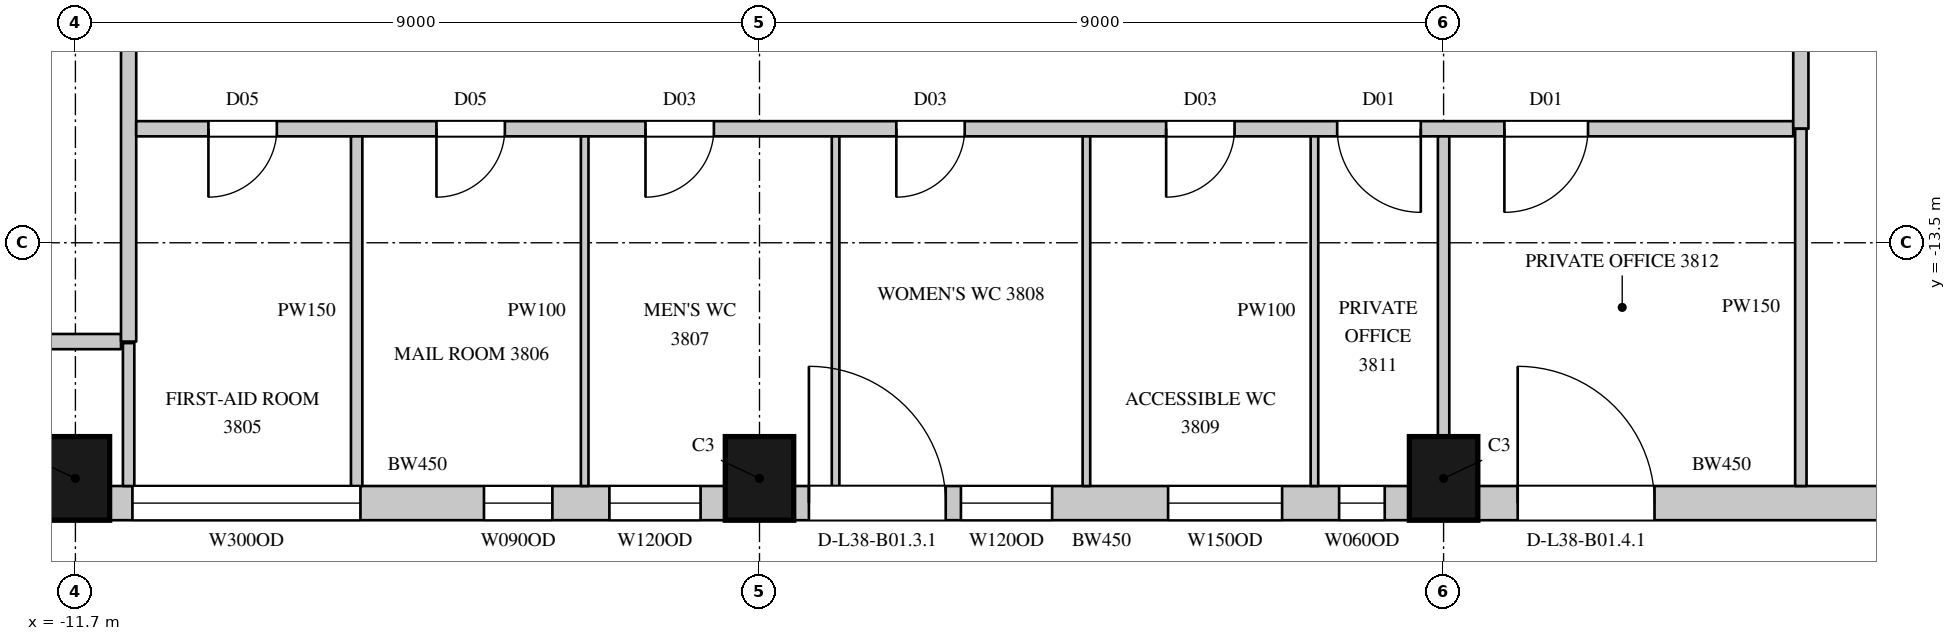
"""IFC4 building model, lengths in metres.
Left out: names, types, materials, properties, quantities, classifications, styles, units other than length and angle.
Written with IfcOpenShell. Run it as: python <this file> out.ifc"""

import sys

from ifc_helpers import new_model, si_unit, direction, frame, frame_2d, origin, origin_2d, place, context, subcontext, project, spatial, rectangle, extrude, element, fill, save


model = new_model("IFC4")
c1 = context("Model", 3, precision=1e-05, world=origin(), true_north=direction((0.0, 1.0)))
c2 = subcontext(c1, "Body", "Model", "MODEL_VIEW")
j1 = project(units=[si_unit("LENGTHUNIT", "METRE"), si_unit("PLANEANGLEUNIT", "RADIAN")], contexts=[c1])
p1 = place(None, origin())
s1 = spatial("IfcSite", under=j1, at=p1, CompositionType="ELEMENT")
p2 = place(p1, origin())
s2 = spatial("IfcBuilding", under=s1, at=p2, CompositionType="ELEMENT")
p3 = place(p2, frame((0.0, 0.0, 176.9)))
s3 = spatial("IfcBuildingStorey", under=s2, at=p3, CompositionType="ELEMENT", Elevation=176.9)
for number, where, z_axis, x_axis in (
    (1, (-11.7, -16.6, 0.0), (0.0, 0.0, 1.0), (1.0, 0.0, 0.0)),
    (2, (-2.7, -16.6, 0.0), (0.0, 0.0, 1.0), (1.0, 0.0, 0.0)),
    (3, (6.3, -16.6, 0.0), (0.0, 0.0, 1.0), (1.0, 0.0, 0.0)),
):
    element("IfcColumn", number, at=place(p3, frame(where, z_axis=z_axis, x_axis=x_axis)), inside=s3, PredefinedType="COLUMN", context=c2, shape_type="SweptSolid", body=[
        extrude(rectangle(XDim=0.9, YDim=1.1, at=origin_2d()), origin(), (0.0, 0.0, 1.0), 4.1),
    ])
p4 = place(p3, frame((-11.25, -16.925, 0.0), z_axis=(0.0, 0.0, 1.0), x_axis=(1.0, 0.0, 0.0)))
e4 = element("IfcWall", 4, at=p4, inside=s3, PredefinedType="SOLIDWALL", context=c2, shape_type="SweptSolid", body=[
    extrude(rectangle(XDim=8.1, YDim=0.45, at=frame_2d((4.05, 0.0))), origin(), (0.0, 0.0, 1.0), 3.8),
])
p5 = place(p4, frame((0.3, 0.0, 1.05)))
e5 = element("IfcOpeningElement", 5, at=p5, cuts=e4, PredefinedType="OPENING", context=c2, shape_type="SweptSolid", body=[
    extrude(rectangle(XDim=3.0, YDim=2.4, at=frame_2d((1.5, 1.2))), frame((0.0, 0.235, 0.0), z_axis=(0.0, -1.0, 0.0), x_axis=(1.0, 0.0, 0.0)), (0.0, 0.0, 1.0), 0.47),
])
p6 = place(p4, frame((4.925, 0.0, 1.05)))
e6 = element("IfcOpeningElement", 6, at=p6, cuts=e4, PredefinedType="OPENING", context=c2, shape_type="SweptSolid", body=[
    extrude(rectangle(XDim=0.9, YDim=2.4, at=frame_2d((0.45, 1.2))), frame((0.0, 0.235, 0.0), z_axis=(0.0, -1.0, 0.0), x_axis=(1.0, 0.0, 0.0)), (0.0, 0.0, 1.0), 0.47),
])
p7 = place(p4, frame((6.575, 0.0, 1.05)))
e7 = element("IfcOpeningElement", 7, at=p7, cuts=e4, PredefinedType="OPENING", context=c2, shape_type="SweptSolid", body=[
    extrude(rectangle(XDim=1.2, YDim=2.4, at=frame_2d((0.6, 1.2))), frame((0.0, 0.235, 0.0), z_axis=(0.0, -1.0, 0.0), x_axis=(1.0, 0.0, 0.0)), (0.0, 0.0, 1.0), 0.47),
])
p8 = place(p3, frame((-2.25, -16.925, 0.0), z_axis=(0.0, 0.0, 1.0), x_axis=(1.0, 0.0, 0.0)))
e8 = element("IfcWall", 8, at=p8, inside=s3, PredefinedType="SOLIDWALL", context=c2, shape_type="SweptSolid", body=[
    extrude(rectangle(XDim=8.1, YDim=0.45, at=frame_2d((4.05, 0.0))), origin(), (0.0, 0.0, 1.0), 3.8),
])
p9 = place(p8, frame((0.2, 0.0, 0.0)))
e9 = element("IfcOpeningElement", 9, at=p9, cuts=e8, PredefinedType="OPENING", context=c2, shape_type="SweptSolid", body=[
    extrude(rectangle(XDim=1.8, YDim=2.4, at=frame_2d((0.9, 1.2))), frame((0.0, 0.235, 0.0), z_axis=(0.0, -1.0, 0.0), x_axis=(1.0, 0.0, 0.0)), (0.0, 0.0, 1.0), 0.47),
])
p10 = place(p8, frame((2.2, 0.0, 1.05)))
e10 = element("IfcOpeningElement", 10, at=p10, cuts=e8, PredefinedType="OPENING", context=c2, shape_type="SweptSolid", body=[
    extrude(rectangle(XDim=1.2, YDim=2.4, at=frame_2d((0.6, 1.2))), frame((0.0, 0.235, 0.0), z_axis=(0.0, -1.0, 0.0), x_axis=(1.0, 0.0, 0.0)), (0.0, 0.0, 1.0), 0.47),
])
p11 = place(p8, frame((4.926, 0.0, 1.05)))
e11 = element("IfcOpeningElement", 11, at=p11, cuts=e8, PredefinedType="OPENING", context=c2, shape_type="SweptSolid", body=[
    extrude(rectangle(XDim=1.5, YDim=2.4, at=frame_2d((0.75, 1.2))), frame((0.0, 0.235, 0.0), z_axis=(0.0, -1.0, 0.0), x_axis=(1.0, 0.0, 0.0)), (0.0, 0.0, 1.0), 0.47),
])
p12 = place(p8, frame((7.176, 0.0, 1.05)))
e12 = element("IfcOpeningElement", 12, at=p12, cuts=e8, PredefinedType="OPENING", context=c2, shape_type="SweptSolid", body=[
    extrude(rectangle(XDim=0.6, YDim=2.4, at=frame_2d((0.3, 1.2))), frame((0.0, 0.235, 0.0), z_axis=(0.0, -1.0, 0.0), x_axis=(1.0, 0.0, 0.0)), (0.0, 0.0, 1.0), 0.47),
])
p13 = place(p3, frame((6.75, -16.925, 0.0), z_axis=(0.0, 0.0, 1.0), x_axis=(1.0, 0.0, 0.0)))
e13 = element("IfcWall", 13, at=p13, inside=s3, PredefinedType="SOLIDWALL", context=c2, shape_type="SweptSolid", body=[
    extrude(rectangle(XDim=6.414, YDim=0.45, at=frame_2d((3.207, 0.0))), origin(), (0.0, 0.0, 1.0), 3.8),
])
p14 = place(p13, frame((0.525, 0.0, 0.0)))
e14 = element("IfcOpeningElement", 14, at=p14, cuts=e13, PredefinedType="OPENING", context=c2, shape_type="SweptSolid", body=[
    extrude(rectangle(XDim=1.8, YDim=2.4, at=frame_2d((0.9, 1.2))), frame((0.0, 0.235, 0.0), z_axis=(0.0, -1.0, 0.0), x_axis=(1.0, 0.0, 0.0)), (0.0, 0.0, 1.0), 0.47),
])
p15 = place(p3, frame((-13.97, -14.8, 0.0), z_axis=(0.0, 0.0, 1.0), x_axis=(1.0, 0.0, 0.0)))
e15 = element("IfcWall", 15, at=p15, inside=s3, PredefinedType="PARTITIONING", context=c2, shape_type="SweptSolid", body=[
    extrude(rectangle(XDim=2.87, YDim=0.2, at=frame_2d((1.435, 0.0))), origin(), (0.0, 0.0, 1.0), 3.8),
])
p16 = place(p3, frame((-11.0, -14.8, 0.0), z_axis=(0.0, 0.0, 1.0), x_axis=(0.0, 1.0, 0.0)))
e16 = element("IfcWall", 16, at=p16, inside=s3, PredefinedType="PARTITIONING", context=c2, shape_type="SweptSolid", body=[
    extrude(rectangle(XDim=29.6, YDim=0.2, at=frame_2d((14.8, 0.0))), origin(), (0.0, 0.0, 1.0), 3.8),
])
p17 = place(p16, frame((14.15, 0.0, 0.0)))
e17 = element("IfcOpeningElement", 17, at=p17, cuts=e16, PredefinedType="OPENING", context=c2, shape_type="SweptSolid", body=[
    extrude(rectangle(XDim=1.5, YDim=2.4, at=frame_2d((0.75, 1.2))), frame((0.0, 0.11, 0.0), z_axis=(0.0, -1.0, 0.0), x_axis=(1.0, 0.0, 0.0)), (0.0, 0.0, 1.0), 0.22),
])
p18 = place(p3, frame((-10.9, -12.0, 0.0), z_axis=(0.0, 0.0, 1.0), x_axis=(1.0, 0.0, 0.0)))
e18 = element("IfcWall", 18, at=p18, inside=s3, PredefinedType="PARTITIONING", context=c2, shape_type="SweptSolid", body=[
    extrude(rectangle(XDim=21.8, YDim=0.2, at=frame_2d((10.9, 0.0))), origin(), (0.0, 0.0, 1.0), 3.8),
])
p19 = place(p18, frame((0.95, 0.0, 0.0)))
e19 = element("IfcOpeningElement", 19, at=p19, cuts=e18, PredefinedType="OPENING", context=c2, shape_type="SweptSolid", body=[
    extrude(rectangle(XDim=0.9, YDim=2.2, at=frame_2d((0.45, 1.1))), frame((0.0, 0.11, 0.0), z_axis=(0.0, -1.0, 0.0), x_axis=(1.0, 0.0, 0.0)), (0.0, 0.0, 1.0), 0.22),
])
p20 = place(p18, frame((3.95, 0.0, 0.0)))
e20 = element("IfcOpeningElement", 20, at=p20, cuts=e18, PredefinedType="OPENING", context=c2, shape_type="SweptSolid", body=[
    extrude(rectangle(XDim=0.9, YDim=2.2, at=frame_2d((0.45, 1.1))), frame((0.0, 0.11, 0.0), z_axis=(0.0, -1.0, 0.0), x_axis=(1.0, 0.0, 0.0)), (0.0, 0.0, 1.0), 0.22),
])
p21 = place(p18, frame((6.7, 0.0, 0.0)))
e21 = element("IfcOpeningElement", 21, at=p21, cuts=e18, PredefinedType="OPENING", context=c2, shape_type="SweptSolid", body=[
    extrude(rectangle(XDim=0.9, YDim=2.2, at=frame_2d((0.45, 1.1))), frame((0.0, 0.11, 0.0), z_axis=(0.0, -1.0, 0.0), x_axis=(1.0, 0.0, 0.0)), (0.0, 0.0, 1.0), 0.22),
])
p22 = place(p18, frame((10.0, 0.0, 0.0)))
e22 = element("IfcOpeningElement", 22, at=p22, cuts=e18, PredefinedType="OPENING", context=c2, shape_type="SweptSolid", body=[
    extrude(rectangle(XDim=0.9, YDim=2.2, at=frame_2d((0.45, 1.1))), frame((0.0, 0.11, 0.0), z_axis=(0.0, -1.0, 0.0), x_axis=(1.0, 0.0, 0.0)), (0.0, 0.0, 1.0), 0.22),
])
p23 = place(p18, frame((13.55, 0.0, 0.0)))
e23 = element("IfcOpeningElement", 23, at=p23, cuts=e18, PredefinedType="OPENING", context=c2, shape_type="SweptSolid", body=[
    extrude(rectangle(XDim=0.9, YDim=2.2, at=frame_2d((0.45, 1.1))), frame((0.0, 0.11, 0.0), z_axis=(0.0, -1.0, 0.0), x_axis=(1.0, 0.0, 0.0)), (0.0, 0.0, 1.0), 0.22),
])
p24 = place(p18, frame((15.8, 0.0, 0.0)))
e24 = element("IfcOpeningElement", 24, at=p24, cuts=e18, PredefinedType="OPENING", context=c2, shape_type="SweptSolid", body=[
    extrude(rectangle(XDim=1.1, YDim=2.4, at=frame_2d((0.55, 1.2))), frame((0.0, 0.11, 0.0), z_axis=(0.0, -1.0, 0.0), x_axis=(1.0, 0.0, 0.0)), (0.0, 0.0, 1.0), 0.22),
])
p25 = place(p18, frame((18.0, 0.0, 0.0)))
e25 = element("IfcOpeningElement", 25, at=p25, cuts=e18, PredefinedType="OPENING", context=c2, shape_type="SweptSolid", body=[
    extrude(rectangle(XDim=1.1, YDim=2.4, at=frame_2d((0.55, 1.2))), frame((0.0, 0.11, 0.0), z_axis=(0.0, -1.0, 0.0), x_axis=(1.0, 0.0, 0.0)), (0.0, 0.0, 1.0), 0.22),
])
p26 = place(p3, frame((11.0, -12.0, 0.0), z_axis=(0.0, 0.0, 1.0), x_axis=(0.0, 1.0, 0.0)))
e26 = element("IfcWall", 26, at=p26, inside=s3, PredefinedType="PARTITIONING", context=c2, shape_type="SweptSolid", body=[
    extrude(rectangle(XDim=24.1, YDim=0.2, at=frame_2d((12.05, 0.0))), origin(), (0.0, 0.0, 1.0), 3.8),
])
p27 = place(p26, frame((9.85, 0.0, 0.0)))
e27 = element("IfcOpeningElement", 27, at=p27, cuts=e26, PredefinedType="OPENING", context=c2, shape_type="SweptSolid", body=[
    extrude(rectangle(XDim=1.5, YDim=2.4, at=frame_2d((0.75, 1.2))), frame((0.0, 0.11, 0.0), z_axis=(0.0, -1.0, 0.0), x_axis=(1.0, 0.0, 0.0)), (0.0, 0.0, 1.0), 0.22),
])
p28 = place(p26, frame((3.15, 0.0, 0.0)))
e28 = element("IfcOpeningElement", 28, at=p28, cuts=e26, PredefinedType="OPENING", context=c2, shape_type="SweptSolid", body=[
    extrude(rectangle(XDim=1.1, YDim=2.4, at=frame_2d((0.55, 1.2))), frame((0.0, 0.11, 0.0), z_axis=(0.0, -1.0, 0.0), x_axis=(1.0, 0.0, 0.0)), (0.0, 0.0, 1.0), 0.22),
])
p29 = place(p3, frame((-11.0, -16.7, 0.0), z_axis=(0.0, 0.0, 1.0), x_axis=(0.0, 1.0, 0.0)))
e29 = element("IfcWall", 29, at=p29, inside=s3, PredefinedType="PARTITIONING", context=c2, shape_type="SweptSolid", body=[
    extrude(rectangle(XDim=1.88, YDim=0.15, at=frame_2d((0.94, 0.0))), origin(), (0.0, 0.0, 1.0), 3.8),
])
p30 = place(p3, frame((-8.0, -16.7, 0.0), z_axis=(0.0, 0.0, 1.0), x_axis=(0.0, 1.0, 0.0)))
e30 = element("IfcWall", 30, at=p30, inside=s3, PredefinedType="PARTITIONING", context=c2, shape_type="SweptSolid", body=[
    extrude(rectangle(XDim=4.6, YDim=0.15, at=frame_2d((2.3, 0.0))), origin(), (0.0, 0.0, 1.0), 3.8),
])
p31 = place(p3, frame((6.3, -16.05, 0.0), z_axis=(0.0, 0.0, 1.0), x_axis=(0.0, 1.0, 0.0)))
e31 = element("IfcWall", 31, at=p31, inside=s3, PredefinedType="PARTITIONING", context=c2, shape_type="SweptSolid", body=[
    extrude(rectangle(XDim=3.95, YDim=0.15, at=frame_2d((1.975, 0.0))), origin(), (0.0, 0.0, 1.0), 3.25),
])
p32 = place(p3, frame((11.0, -16.7, 0.0), z_axis=(0.0, 0.0, 1.0), x_axis=(0.0, 1.0, 0.0)))
e32 = element("IfcWall", 32, at=p32, inside=s3, PredefinedType="PARTITIONING", context=c2, shape_type="SweptSolid", body=[
    extrude(rectangle(XDim=4.7, YDim=0.15, at=frame_2d((2.35, 0.0))), origin(), (0.0, 0.0, 1.0), 3.8),
])
for number, where, z_axis, x_axis in (
    (33, (-5.0, -16.7, 0.0), (0.0, 0.0, 1.0), (0.0, 1.0, 0.0)),
    (34, (-1.699, -16.7, 0.0), (0.0, 0.0, 1.0), (0.0, 1.0, 0.0)),
):
    element("IfcWall", number, at=place(p3, frame(where, z_axis=z_axis, x_axis=x_axis)), inside=s3, PredefinedType="PARTITIONING", context=c2, shape_type="SweptSolid", body=[
        extrude(rectangle(XDim=4.6, YDim=0.1, at=frame_2d((2.3, 0.0))), origin(), (0.0, 0.0, 1.0), 3.8),
    ])
p33 = place(p3, frame((1.601, -16.7, 0.0), z_axis=(0.0, 0.0, 1.0), x_axis=(0.0, 1.0, 0.0)))
e35 = element("IfcWall", 35, at=p33, inside=s3, PredefinedType="PARTITIONING", context=c2, shape_type="SweptSolid", body=[
    extrude(rectangle(XDim=4.6, YDim=0.1, at=frame_2d((2.3, 0.0))), origin(), (0.0, 0.0, 1.0), 3.15),
])
p34 = place(p3, frame((4.601, -16.7, 0.0), z_axis=(0.0, 0.0, 1.0), x_axis=(0.0, 1.0, 0.0)))
e36 = element("IfcWall", 36, at=p34, inside=s3, PredefinedType="PARTITIONING", context=c2, shape_type="SweptSolid", body=[
    extrude(rectangle(XDim=4.6, YDim=0.1, at=frame_2d((2.3, 0.0))), origin(), (0.0, 0.0, 1.0), 3.8),
])
p35 = place(p5, origin())
e37 = element("IfcWindow", 37, at=p35, inside=s3, PartitioningType="SINGLE_PANEL", PredefinedType="WINDOW", context=c2, shape_type="SweptSolid", body=[
    extrude(rectangle(XDim=3.0, YDim=2.4, at=frame_2d((1.5, 1.2))), frame((0.0, 0.135, 0.0), z_axis=(0.0, -1.0, 0.0), x_axis=(1.0, 0.0, 0.0)), (0.0, 0.0, 1.0), 0.06),
])
fill(e5, e37)
p36 = place(p9, origin())
e38 = element("IfcDoor", 38, at=p36, inside=s3, OperationType="SLIDING_TO_LEFT", PredefinedType="DOOR", context=c2, shape_type="SweptSolid", body=[
    extrude(rectangle(XDim=1.8, YDim=2.4, at=frame_2d((0.9, 1.2))), frame((0.0, 0.13, 0.0), z_axis=(0.0, -1.0, 0.0), x_axis=(1.0, 0.0, 0.0)), (0.0, 0.0, 1.0), 0.05),
])
fill(e9, e38)
p37 = place(p10, origin())
e39 = element("IfcWindow", 39, at=p37, inside=s3, PartitioningType="SINGLE_PANEL", PredefinedType="WINDOW", context=c2, shape_type="SweptSolid", body=[
    extrude(rectangle(XDim=1.2, YDim=2.4, at=frame_2d((0.6, 1.2))), frame((0.0, 0.135, 0.0), z_axis=(0.0, -1.0, 0.0), x_axis=(1.0, 0.0, 0.0)), (0.0, 0.0, 1.0), 0.06),
])
fill(e10, e39)
p38 = place(p14, origin())
e40 = element("IfcDoor", 40, at=p38, inside=s3, OperationType="SLIDING_TO_LEFT", PredefinedType="DOOR", context=c2, shape_type="SweptSolid", body=[
    extrude(rectangle(XDim=1.8, YDim=2.4, at=frame_2d((0.9, 1.2))), frame((0.0, 0.13, 0.0), z_axis=(0.0, -1.0, 0.0), x_axis=(1.0, 0.0, 0.0)), (0.0, 0.0, 1.0), 0.05),
])
fill(e14, e40)
p39 = place(p19, origin())
e41 = element("IfcDoor", 41, at=p39, inside=s3, OperationType="SINGLE_SWING_RIGHT", PredefinedType="DOOR", context=c2, shape_type="SweptSolid", body=[
    extrude(rectangle(XDim=0.9, YDim=2.2, at=frame_2d((0.45, 1.1))), frame((0.0, 0.025, 0.0), z_axis=(0.0, -1.0, 0.0), x_axis=(1.0, 0.0, 0.0)), (0.0, 0.0, 1.0), 0.05),
])
fill(e19, e41)
p40 = place(p20, origin())
e42 = element("IfcDoor", 42, at=p40, inside=s3, OperationType="SINGLE_SWING_RIGHT", PredefinedType="DOOR", context=c2, shape_type="SweptSolid", body=[
    extrude(rectangle(XDim=0.9, YDim=2.2, at=frame_2d((0.45, 1.1))), frame((0.0, 0.025, 0.0), z_axis=(0.0, -1.0, 0.0), x_axis=(1.0, 0.0, 0.0)), (0.0, 0.0, 1.0), 0.05),
])
fill(e20, e42)
p41 = place(p21, origin())
e43 = element("IfcDoor", 43, at=p41, inside=s3, OperationType="SINGLE_SWING_RIGHT", PredefinedType="DOOR", context=c2, shape_type="SweptSolid", body=[
    extrude(rectangle(XDim=0.9, YDim=2.2, at=frame_2d((0.45, 1.1))), frame((0.0, 0.025, 0.0), z_axis=(0.0, -1.0, 0.0), x_axis=(1.0, 0.0, 0.0)), (0.0, 0.0, 1.0), 0.05),
])
fill(e21, e43)
p42 = place(p22, origin())
e44 = element("IfcDoor", 44, at=p42, inside=s3, OperationType="SINGLE_SWING_RIGHT", PredefinedType="DOOR", context=c2, shape_type="SweptSolid", body=[
    extrude(rectangle(XDim=0.9, YDim=2.2, at=frame_2d((0.45, 1.1))), frame((0.0, 0.025, 0.0), z_axis=(0.0, -1.0, 0.0), x_axis=(1.0, 0.0, 0.0)), (0.0, 0.0, 1.0), 0.05),
])
fill(e22, e44)
p43 = place(p23, origin())
e45 = element("IfcDoor", 45, at=p43, inside=s3, OperationType="SINGLE_SWING_RIGHT", PredefinedType="DOOR", context=c2, shape_type="SweptSolid", body=[
    extrude(rectangle(XDim=0.9, YDim=2.2, at=frame_2d((0.45, 1.1))), frame((0.0, 0.025, 0.0), z_axis=(0.0, -1.0, 0.0), x_axis=(1.0, 0.0, 0.0)), (0.0, 0.0, 1.0), 0.05),
])
fill(e23, e45)
p44 = place(p24, origin())
e46 = element("IfcDoor", 46, at=p44, inside=s3, OperationType="SINGLE_SWING_LEFT", PredefinedType="DOOR", context=c2, shape_type="SweptSolid", body=[
    extrude(rectangle(XDim=1.1, YDim=2.4, at=frame_2d((0.55, 1.2))), frame((0.0, 0.025, 0.0), z_axis=(0.0, -1.0, 0.0), x_axis=(1.0, 0.0, 0.0)), (0.0, 0.0, 1.0), 0.05),
])
fill(e24, e46)
p45 = place(p25, origin())
e47 = element("IfcDoor", 47, at=p45, inside=s3, OperationType="SINGLE_SWING_RIGHT", PredefinedType="DOOR", context=c2, shape_type="SweptSolid", body=[
    extrude(rectangle(XDim=1.1, YDim=2.4, at=frame_2d((0.55, 1.2))), frame((0.0, 0.025, 0.0), z_axis=(0.0, -1.0, 0.0), x_axis=(1.0, 0.0, 0.0)), (0.0, 0.0, 1.0), 0.05),
])
fill(e25, e47)
p46 = place(p6, origin())
e48 = element("IfcWindow", 48, at=p46, inside=s3, PartitioningType="SINGLE_PANEL", PredefinedType="WINDOW", context=c2, shape_type="SweptSolid", body=[
    extrude(rectangle(XDim=0.9, YDim=2.4, at=frame_2d((0.45, 1.2))), frame((0.0, 0.135, 0.0), z_axis=(0.0, -1.0, 0.0), x_axis=(1.0, 0.0, 0.0)), (0.0, 0.0, 1.0), 0.06),
])
fill(e6, e48)
p47 = place(p7, origin())
e49 = element("IfcWindow", 49, at=p47, inside=s3, PartitioningType="SINGLE_PANEL", PredefinedType="WINDOW", context=c2, shape_type="SweptSolid", body=[
    extrude(rectangle(XDim=1.2, YDim=2.4, at=frame_2d((0.6, 1.2))), frame((0.0, 0.135, 0.0), z_axis=(0.0, -1.0, 0.0), x_axis=(1.0, 0.0, 0.0)), (0.0, 0.0, 1.0), 0.06),
])
fill(e7, e49)
p48 = place(p11, origin())
e50 = element("IfcWindow", 50, at=p48, inside=s3, PartitioningType="SINGLE_PANEL", PredefinedType="WINDOW", context=c2, shape_type="SweptSolid", body=[
    extrude(rectangle(XDim=1.5, YDim=2.4, at=frame_2d((0.75, 1.2))), frame((0.0, 0.135, 0.0), z_axis=(0.0, -1.0, 0.0), x_axis=(1.0, 0.0, 0.0)), (0.0, 0.0, 1.0), 0.06),
])
fill(e11, e50)
p49 = place(p12, origin())
e51 = element("IfcWindow", 51, at=p49, inside=s3, PartitioningType="SINGLE_PANEL", PredefinedType="WINDOW", context=c2, shape_type="SweptSolid", body=[
    extrude(rectangle(XDim=0.6, YDim=2.4, at=frame_2d((0.3, 1.2))), frame((0.0, 0.135, 0.0), z_axis=(0.0, -1.0, 0.0), x_axis=(1.0, 0.0, 0.0)), (0.0, 0.0, 1.0), 0.06),
])
fill(e12, e51)
save(model, sys.argv[1])
